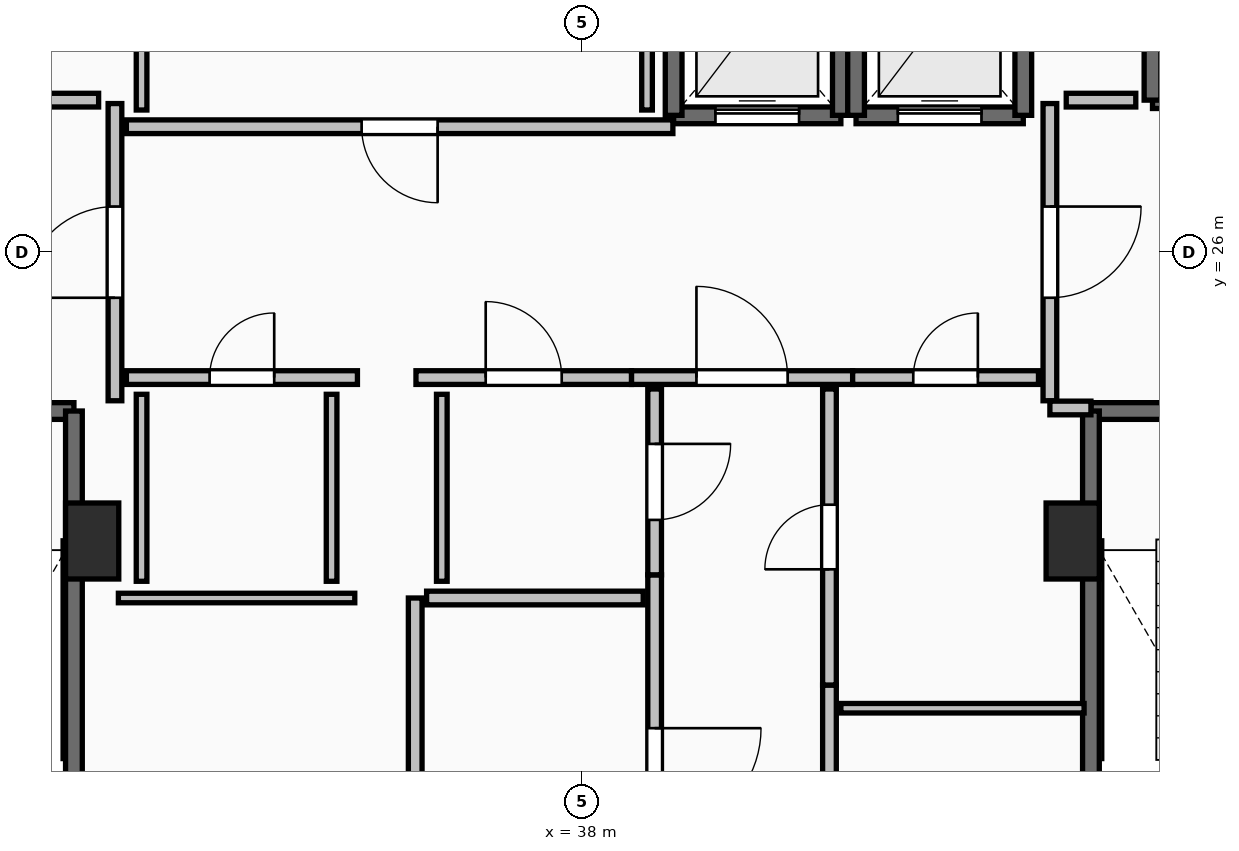
"""IFC4 building model, lengths in metres.
Left out: names, types, materials, properties, quantities, classifications, styles, units other than length and angle.
Written with IfcOpenShell. Run it as: python <this file> out.ifc"""

import sys

from ifc_helpers import new_model, si_unit, direction, frame, frame_2d, origin, origin_2d, place, context, subcontext, project, spatial, rectangle, extrude, element, fill, save


model = new_model("IFC4")
c1 = context("Model", 3, precision=1e-05, world=origin(), true_north=direction((0.0, 1.0)))
c2 = subcontext(c1, "Body", "Model", "MODEL_VIEW")
j1 = project(units=[si_unit("LENGTHUNIT", "METRE"), si_unit("PLANEANGLEUNIT", "RADIAN")], contexts=[c1])
p1 = place(None, origin())
s1 = spatial("IfcSite", under=j1, at=p1, CompositionType="ELEMENT")
p2 = place(p1, origin())
s2 = spatial("IfcBuilding", under=s1, at=p2, CompositionType="ELEMENT")
p3 = place(p2, frame((0.0, 0.0, 255.55)))
s3 = spatial("IfcBuildingStorey", under=s2, at=p3, CompositionType="ELEMENT", Elevation=255.55)
for number, where, z_axis, x_axis in (
    (1, (31.55, 22.2, 0.0), (0.0, 0.0, 1.0), (1.0, 0.0, 0.0)),
    (2, (44.45, 22.2, 0.0), (0.0, 0.0, 1.0), (1.0, 0.0, 0.0)),
):
    element("IfcColumn", number, at=place(p3, frame(where, z_axis=z_axis, x_axis=x_axis)), inside=s3, PredefinedType="PILASTER", context=c2, shape_type="SweptSolid", body=[
        extrude(rectangle(XDim=0.7, YDim=1.0, at=origin_2d()), origin(), (0.0, 0.0, 1.0), 3.55),
    ])
p4 = place(p3, frame((27.94, 23.91, 0.0), z_axis=(0.0, 0.0, 1.0), x_axis=(1.0, 0.0, 0.0)))
e3 = element("IfcWall", 3, at=p4, inside=s3, PredefinedType="SOLIDWALL", context=c2, shape_type="SweptSolid", body=[
    extrude(rectangle(XDim=3.37, YDim=0.22, at=frame_2d((1.685, 0.0))), origin(), (0.0, 0.0, 1.0), 3.29),
])
p5 = place(p4, frame((1.135, 0.0, 0.0)))
e4 = element("IfcOpeningElement", 4, at=p5, cuts=e3, PredefinedType="OPENING", context=c2, shape_type="SweptSolid", body=[
    extrude(rectangle(XDim=1.1, YDim=2.15, at=frame_2d((0.55, 1.075))), frame((0.0, 0.125, 0.0), z_axis=(0.0, -1.0, 0.0), x_axis=(1.0, 0.0, 0.0)), (0.0, 0.0, 1.0), 0.25),
])
p6 = place(p3, frame((31.31, 23.91, 0.0), z_axis=(0.0, 0.0, 1.0), x_axis=(0.0, -1.0, 0.0)))
e5 = element("IfcWall", 5, at=p6, inside=s3, PredefinedType="SOLIDWALL", context=c2, shape_type="SweptSolid", body=[
    extrude(rectangle(XDim=7.42, YDim=0.22, at=frame_2d((3.71, 0.0))), origin(), (0.0, 0.0, 1.0), 3.29),
])
p7 = place(p3, frame((44.69, 23.91, 0.0), z_axis=(0.0, 0.0, 1.0), x_axis=(1.0, 0.0, 0.0)))
e6 = element("IfcWall", 6, at=p7, inside=s3, PredefinedType="SOLIDWALL", context=c2, shape_type="SweptSolid", body=[
    extrude(rectangle(XDim=3.37, YDim=0.22, at=frame_2d((1.685, 0.0))), origin(), (0.0, 0.0, 1.0), 3.29),
])
p8 = place(p7, frame((1.135, 0.0, 0.0)))
e7 = element("IfcOpeningElement", 7, at=p8, cuts=e6, PredefinedType="OPENING", context=c2, shape_type="SweptSolid", body=[
    extrude(rectangle(XDim=1.1, YDim=2.15, at=frame_2d((0.55, 1.075))), frame((0.0, 0.125, 0.0), z_axis=(0.0, -1.0, 0.0), x_axis=(1.0, 0.0, 0.0)), (0.0, 0.0, 1.0), 0.25),
])
p9 = place(p3, frame((44.69, 16.49, 0.0), z_axis=(0.0, 0.0, 1.0), x_axis=(0.0, 1.0, 0.0)))
e8 = element("IfcWall", 8, at=p9, inside=s3, PredefinedType="SOLIDWALL", context=c2, shape_type="SweptSolid", body=[
    extrude(rectangle(XDim=7.42, YDim=0.22, at=frame_2d((3.71, 0.0))), origin(), (0.0, 0.0, 1.0), 3.29),
])
p10 = place(p3, frame((39.2, 27.8, 0.0), z_axis=(0.0, 0.0, 1.0), x_axis=(1.0, 0.0, 0.0)))
e9 = element("IfcWall", 9, at=p10, inside=s3, PredefinedType="SOLIDWALL", context=c2, shape_type="SweptSolid", body=[
    extrude(rectangle(XDim=2.2, YDim=0.22, at=frame_2d((1.1, 0.0))), origin(), (0.0, 0.0, 1.0), 3.29),
])
p11 = place(p10, frame((0.55, 0.0, 0.0)))
e10 = element("IfcOpeningElement", 10, at=p11, cuts=e9, PredefinedType="OPENING", context=c2, shape_type="SweptSolid", body=[
    extrude(rectangle(XDim=1.1, YDim=2.2, at=frame_2d((0.55, 1.1))), frame((0.0, 0.125, 0.0), z_axis=(0.0, -1.0, 0.0), x_axis=(1.0, 0.0, 0.0)), (0.0, 0.0, 1.0), 0.25),
])
for number, where, z_axis, x_axis in (
    (11, (41.4, 27.8, 0.0), (0.0, 0.0, 1.0), (0.0, 1.0, 0.0)),
    (12, (39.2, 30.4, 0.0), (0.0, 0.0, 1.0), (0.0, -1.0, 0.0)),
):
    element("IfcWall", number, at=place(p3, frame(where, z_axis=z_axis, x_axis=x_axis)), inside=s3, PredefinedType="SOLIDWALL", context=c2, shape_type="SweptSolid", body=[
        extrude(rectangle(XDim=2.6, YDim=0.22, at=frame_2d((1.3, 0.0))), origin(), (0.0, 0.0, 1.0), 3.29),
    ])
p12 = place(p3, frame((41.6, 27.8, 0.0), z_axis=(0.0, 0.0, 1.0), x_axis=(1.0, 0.0, 0.0)))
e13 = element("IfcWall", 13, at=p12, inside=s3, PredefinedType="SOLIDWALL", context=c2, shape_type="SweptSolid", body=[
    extrude(rectangle(XDim=2.2, YDim=0.22, at=frame_2d((1.1, 0.0))), origin(), (0.0, 0.0, 1.0), 3.29),
])
p13 = place(p12, frame((0.55, 0.0, 0.0)))
e14 = element("IfcOpeningElement", 14, at=p13, cuts=e13, PredefinedType="OPENING", context=c2, shape_type="SweptSolid", body=[
    extrude(rectangle(XDim=1.1, YDim=2.2, at=frame_2d((0.55, 1.1))), frame((0.0, 0.125, 0.0), z_axis=(0.0, -1.0, 0.0), x_axis=(1.0, 0.0, 0.0)), (0.0, 0.0, 1.0), 0.25),
])
for number, where, z_axis, x_axis in (
    (15, (43.8, 27.8, 0.0), (0.0, 0.0, 1.0), (0.0, 1.0, 0.0)),
    (16, (41.6, 30.4, 0.0), (0.0, 0.0, 1.0), (0.0, -1.0, 0.0)),
):
    element("IfcWall", number, at=place(p3, frame(where, z_axis=z_axis, x_axis=x_axis)), inside=s3, PredefinedType="SOLIDWALL", context=c2, shape_type="SweptSolid", body=[
        extrude(rectangle(XDim=2.6, YDim=0.22, at=frame_2d((1.3, 0.0))), origin(), (0.0, 0.0, 1.0), 3.29),
    ])
p14 = place(p3, frame((45.5, 28.0, 0.0), z_axis=(0.0, 0.0, 1.0), x_axis=(1.0, 0.0, 0.0)))
e17 = element("IfcWall", 17, at=p14, inside=s3, PredefinedType="SHEAR", context=c2, shape_type="SweptSolid", body=[
    extrude(rectangle(XDim=2.4, YDim=0.22, at=frame_2d((1.2, 0.0))), origin(), (0.0, 0.0, 1.0), 3.29),
])
p15 = place(p14, frame((0.6, 0.0, 0.0)))
e18 = element("IfcOpeningElement", 18, at=p15, cuts=e17, PredefinedType="OPENING", context=c2, shape_type="SweptSolid", body=[
    extrude(rectangle(XDim=1.2, YDim=2.2, at=frame_2d((0.6, 1.1))), frame((0.0, 0.125, 0.0), z_axis=(0.0, -1.0, 0.0), x_axis=(1.0, 0.0, 0.0)), (0.0, 0.0, 1.0), 0.25),
])
p16 = place(p3, frame((45.5, 30.5, 0.0), z_axis=(0.0, 0.0, 1.0), x_axis=(0.0, -1.0, 0.0)))
e19 = element("IfcWall", 19, at=p16, inside=s3, PredefinedType="SHEAR", context=c2, shape_type="SweptSolid", body=[
    extrude(rectangle(XDim=2.5, YDim=0.22, at=frame_2d((1.25, 0.0))), origin(), (0.0, 0.0, 1.0), 3.29),
])
p17 = place(p3, frame((31.85, 24.045, 0.0), z_axis=(0.0, 0.0, 1.0), x_axis=(0.0, 1.0, 0.0)))
e20 = element("IfcWall", 20, at=p17, inside=s3, PredefinedType="PARTITIONING", context=c2, shape_type="SweptSolid", body=[
    extrude(rectangle(XDim=3.91, YDim=0.18, at=frame_2d((1.955, 0.0))), origin(), (0.0, 0.0, 1.0), 3.29),
])
p18 = place(p17, frame((1.355, 0.0, 0.0)))
e21 = element("IfcOpeningElement", 21, at=p18, cuts=e20, PredefinedType="OPENING", context=c2, shape_type="SweptSolid", body=[
    extrude(rectangle(XDim=1.2, YDim=2.15, at=frame_2d((0.6, 1.075))), frame((0.0, 0.105, 0.0), z_axis=(0.0, -1.0, 0.0), x_axis=(1.0, 0.0, 0.0)), (0.0, 0.0, 1.0), 0.21),
])
p19 = place(p3, frame((44.15, 27.955, 0.0), z_axis=(0.0, 0.0, 1.0), x_axis=(0.0, -1.0, 0.0)))
e22 = element("IfcWall", 22, at=p19, inside=s3, PredefinedType="PARTITIONING", context=c2, shape_type="SweptSolid", body=[
    extrude(rectangle(XDim=3.91, YDim=0.18, at=frame_2d((1.955, 0.0))), origin(), (0.0, 0.0, 1.0), 3.29),
])
p20 = place(p19, frame((1.355, 0.0, 0.0)))
e23 = element("IfcOpeningElement", 23, at=p20, cuts=e22, PredefinedType="OPENING", context=c2, shape_type="SweptSolid", body=[
    extrude(rectangle(XDim=1.2, YDim=2.15, at=frame_2d((0.6, 1.075))), frame((0.0, 0.105, 0.0), z_axis=(0.0, -1.0, 0.0), x_axis=(1.0, 0.0, 0.0)), (0.0, 0.0, 1.0), 0.21),
])
p21 = place(p3, frame((44.15, 23.95, 0.0), z_axis=(0.0, 0.0, 1.0), x_axis=(1.0, 0.0, 0.0)))
e24 = element("IfcWall", 24, at=p21, inside=s3, PredefinedType="PARTITIONING", context=c2, shape_type="SweptSolid", body=[
    extrude(rectangle(XDim=0.54, YDim=0.18, at=frame_2d((0.27, 0.0))), origin(), (0.0, 0.0, 1.0), 3.29),
])
p22 = place(p3, frame((38.645, 24.35, 0.0), z_axis=(0.0, 0.0, 1.0), x_axis=(1.0, 0.0, 0.0)))
e25 = element("IfcWall", 25, at=p22, inside=s3, PredefinedType="PARTITIONING", context=c2, shape_type="SweptSolid", body=[
    extrude(rectangle(XDim=2.91, YDim=0.18, at=frame_2d((1.455, 0.0))), origin(), (0.0, 0.0, 1.0), 3.29),
])
p23 = place(p22, frame((0.855, 0.0, 0.0)))
e26 = element("IfcOpeningElement", 26, at=p23, cuts=e25, PredefinedType="OPENING", context=c2, shape_type="SweptSolid", body=[
    extrude(rectangle(XDim=1.2, YDim=2.15, at=frame_2d((0.6, 1.075))), frame((0.0, 0.105, 0.0), z_axis=(0.0, -1.0, 0.0), x_axis=(1.0, 0.0, 0.0)), (0.0, 0.0, 1.0), 0.21),
])
p24 = place(p3, frame((41.555, 24.35, 0.0), z_axis=(0.0, 0.0, 1.0), x_axis=(1.0, 0.0, 0.0)))
e27 = element("IfcWall", 27, at=p24, inside=s3, PredefinedType="PARTITIONING", context=c2, shape_type="SweptSolid", body=[
    extrude(rectangle(XDim=2.445, YDim=0.18, at=frame_2d((1.223, 0.0))), origin(), (0.0, 0.0, 1.0), 3.29),
])
p25 = place(p24, frame((0.798, 0.0, 0.0)))
e28 = element("IfcOpeningElement", 28, at=p25, cuts=e27, PredefinedType="OPENING", context=c2, shape_type="SweptSolid", body=[
    extrude(rectangle(XDim=0.85, YDim=2.1, at=frame_2d((0.425, 1.05))), frame((0.0, 0.105, 0.0), z_axis=(0.0, -1.0, 0.0), x_axis=(1.0, 0.0, 0.0)), (0.0, 0.0, 1.0), 0.21),
])
p26 = place(p3, frame((39.19, 27.65, 0.0), z_axis=(0.0, 0.0, 1.0), x_axis=(-1.0, 0.0, 0.0)))
e29 = element("IfcWall", 29, at=p26, inside=s3, PredefinedType="PARTITIONING", context=c2, shape_type="SweptSolid", body=[
    extrude(rectangle(XDim=7.19, YDim=0.18, at=frame_2d((3.595, 0.0))), origin(), (0.0, 0.0, 1.0), 3.29),
])
p27 = place(p26, frame((3.095, 0.0, 0.0)))
e30 = element("IfcOpeningElement", 30, at=p27, cuts=e29, PredefinedType="OPENING", context=c2, shape_type="SweptSolid", body=[
    extrude(rectangle(XDim=1.0, YDim=2.15, at=frame_2d((0.5, 1.075))), frame((0.0, 0.105, 0.0), z_axis=(0.0, -1.0, 0.0), x_axis=(1.0, 0.0, 0.0)), (0.0, 0.0, 1.0), 0.21),
])
p28 = place(p3, frame((32.0, 24.35, 0.0), z_axis=(0.0, 0.0, 1.0), x_axis=(1.0, 0.0, 0.0)))
e31 = element("IfcWall", 31, at=p28, inside=s3, PredefinedType="PARTITIONING", context=c2, shape_type="SweptSolid", body=[
    extrude(rectangle(XDim=3.04, YDim=0.18, at=frame_2d((1.52, 0.0))), origin(), (0.0, 0.0, 1.0), 3.29),
])
p29 = place(p28, frame((1.095, 0.0, 0.0)))
e32 = element("IfcOpeningElement", 32, at=p29, cuts=e31, PredefinedType="OPENING", context=c2, shape_type="SweptSolid", body=[
    extrude(rectangle(XDim=0.85, YDim=2.1, at=frame_2d((0.425, 1.05))), frame((0.0, 0.105, 0.0), z_axis=(0.0, -1.0, 0.0), x_axis=(1.0, 0.0, 0.0)), (0.0, 0.0, 1.0), 0.21),
])
p30 = place(p3, frame((35.81, 24.35, 0.0), z_axis=(0.0, 0.0, 1.0), x_axis=(1.0, 0.0, 0.0)))
e33 = element("IfcWall", 33, at=p30, inside=s3, PredefinedType="PARTITIONING", context=c2, shape_type="SweptSolid", body=[
    extrude(rectangle(XDim=2.835, YDim=0.18, at=frame_2d((1.417, 0.0))), origin(), (0.0, 0.0, 1.0), 3.29),
])
p31 = place(p30, frame((0.917, 0.0, 0.0)))
e34 = element("IfcOpeningElement", 34, at=p31, cuts=e33, PredefinedType="OPENING", context=c2, shape_type="SweptSolid", body=[
    extrude(rectangle(XDim=1.0, YDim=2.15, at=frame_2d((0.5, 1.075))), frame((0.0, 0.105, 0.0), z_axis=(0.0, -1.0, 0.0), x_axis=(1.0, 0.0, 0.0)), (0.0, 0.0, 1.0), 0.21),
])
p32 = place(p3, frame((41.25, 16.32, 0.0), z_axis=(0.0, 0.0, 1.0), x_axis=(0.0, 1.0, 0.0)))
e35 = element("IfcWall", 35, at=p32, inside=s3, PredefinedType="PARTITIONING", context=c2, shape_type="SweptSolid", body=[
    extrude(rectangle(XDim=3.985, YDim=0.18, at=frame_2d((1.992, 0.0))), origin(), (0.0, 0.0, 1.0), 3.29),
])
p33 = place(p32, frame((1.593, 0.0, 0.0)))
e36 = element("IfcOpeningElement", 36, at=p33, cuts=e35, PredefinedType="OPENING", context=c2, shape_type="SweptSolid", body=[
    extrude(rectangle(XDim=0.8, YDim=2.05, at=frame_2d((0.4, 1.025))), frame((0.0, 0.105, 0.0), z_axis=(0.0, -1.0, 0.0), x_axis=(1.0, 0.0, 0.0)), (0.0, 0.0, 1.0), 0.21),
])
p34 = place(p3, frame((41.25, 20.305, 0.0), z_axis=(0.0, 0.0, 1.0), x_axis=(0.0, 1.0, 0.0)))
e37 = element("IfcWall", 37, at=p34, inside=s3, PredefinedType="PARTITIONING", context=c2, shape_type="SweptSolid", body=[
    extrude(rectangle(XDim=3.895, YDim=0.18, at=frame_2d((1.948, 0.0))), origin(), (0.0, 0.0, 1.0), 2.482),
])
p35 = place(p34, frame((1.522, 0.0, 0.0)))
e38 = element("IfcOpeningElement", 38, at=p35, cuts=e37, PredefinedType="OPENING", context=c2, shape_type="SweptSolid", body=[
    extrude(rectangle(XDim=0.85, YDim=2.1, at=frame_2d((0.425, 1.05))), frame((0.0, 0.105, 0.0), z_axis=(0.0, -1.0, 0.0), x_axis=(1.0, 0.0, 0.0)), (0.0, 0.0, 1.0), 0.21),
])
p36 = place(p3, frame((38.95, 21.755, 0.0), z_axis=(0.0, 0.0, 1.0), x_axis=(0.0, -1.0, 0.0)))
e39 = element("IfcWall", 39, at=p36, inside=s3, PredefinedType="PARTITIONING", context=c2, shape_type="SweptSolid", body=[
    extrude(rectangle(XDim=5.435, YDim=0.18, at=frame_2d((2.717, 0.0))), origin(), (0.0, 0.0, 1.0), 3.29),
])
p37 = place(p36, frame((2.018, 0.0, 0.0)))
e40 = element("IfcOpeningElement", 40, at=p37, cuts=e39, PredefinedType="OPENING", context=c2, shape_type="SweptSolid", body=[
    extrude(rectangle(XDim=1.4, YDim=2.2, at=frame_2d((0.7, 1.1))), frame((0.0, 0.105, 0.0), z_axis=(0.0, -1.0, 0.0), x_axis=(1.0, 0.0, 0.0)), (0.0, 0.0, 1.0), 0.21),
])
p38 = place(p3, frame((38.95, 24.2, 0.0), z_axis=(0.0, 0.0, 1.0), x_axis=(0.0, -1.0, 0.0)))
e41 = element("IfcWall", 41, at=p38, inside=s3, PredefinedType="PARTITIONING", context=c2, shape_type="SweptSolid", body=[
    extrude(rectangle(XDim=2.445, YDim=0.18, at=frame_2d((1.223, 0.0))), origin(), (0.0, 0.0, 1.0), 2.482),
])
p39 = place(p38, frame((0.722, 0.0, 0.0)))
e42 = element("IfcOpeningElement", 42, at=p39, cuts=e41, PredefinedType="OPENING", context=c2, shape_type="SweptSolid", body=[
    extrude(rectangle(XDim=1.0, YDim=2.15, at=frame_2d((0.5, 1.075))), frame((0.0, 0.105, 0.0), z_axis=(0.0, -1.0, 0.0), x_axis=(1.0, 0.0, 0.0)), (0.0, 0.0, 1.0), 0.21),
])
p40 = place(p3, frame((44.6, 20.0, 0.0), z_axis=(0.0, 0.0, 1.0), x_axis=(-1.0, 0.0, 0.0)))
e43 = element("IfcWall", 43, at=p40, inside=s3, PredefinedType="PARTITIONING", context=c2, shape_type="SweptSolid", body=[
    extrude(rectangle(XDim=3.2, YDim=0.125, at=frame_2d((1.6, 0.0))), origin(), (0.0, 0.0, 1.0), 3.29),
])
p41 = place(p3, frame((35.8, 16.32, 0.0), z_axis=(0.0, 0.0, 1.0), x_axis=(0.0, 1.0, 0.0)))
e44 = element("IfcWall", 44, at=p41, inside=s3, PredefinedType="PARTITIONING", context=c2, shape_type="SweptSolid", body=[
    extrude(rectangle(XDim=5.13, YDim=0.18, at=frame_2d((2.565, 0.0))), origin(), (0.0, 0.0, 1.0), 3.29),
])
p42 = place(p3, frame((35.005, 21.45, 0.0), z_axis=(0.0, 0.0, 1.0), x_axis=(-1.0, 0.0, 0.0)))
e45 = element("IfcWall", 45, at=p42, inside=s3, PredefinedType="PARTITIONING", context=c2, shape_type="SweptSolid", body=[
    extrude(rectangle(XDim=3.11, YDim=0.125, at=frame_2d((1.555, 0.0))), origin(), (0.0, 0.0, 1.0), 3.29),
])
p43 = place(p3, frame((38.8, 21.45, 0.0), z_axis=(0.0, 0.0, 1.0), x_axis=(-1.0, 0.0, 0.0)))
e46 = element("IfcWall", 46, at=p43, inside=s3, PredefinedType="PARTITIONING", context=c2, shape_type="SweptSolid", body=[
    extrude(rectangle(XDim=2.85, YDim=0.18, at=frame_2d((1.425, 0.0))), origin(), (0.0, 0.0, 1.0), 3.29),
])
for number, where, z_axis, x_axis in (
    (47, (31.635, 28.0, 0.0), (0.0, 0.0, 1.0), (-1.0, 0.0, 0.0)),
    (48, (45.28, 28.0, 0.0), (0.0, 0.0, 1.0), (-1.0, 0.0, 0.0)),
):
    element("IfcWall", number, at=place(p3, frame(where, z_axis=z_axis, x_axis=x_axis)), inside=s3, PredefinedType="PARTITIONING", context=c2, shape_type="SweptSolid", body=[
        extrude(rectangle(XDim=0.915, YDim=0.18, at=frame_2d((0.458, 0.0))), origin(), (0.0, 0.0, 1.0), 3.29),
    ])
for number, where, z_axis, x_axis in (
    (49, (32.2, 30.26, 0.0), (0.0, 0.0, 1.0), (0.0, -1.0, 0.0)),
    (50, (38.85, 27.87, 0.0), (0.0, 0.0, 1.0), (0.0, 1.0, 0.0)),
):
    element("IfcWall", number, at=place(p3, frame(where, z_axis=z_axis, x_axis=x_axis)), inside=s3, PredefinedType="PARTITIONING", context=c2, shape_type="SweptSolid", body=[
        extrude(rectangle(XDim=2.39, YDim=0.14, at=frame_2d((1.195, 0.0))), origin(), (0.0, 0.0, 1.0), 3.29),
    ])
for number, where, z_axis, x_axis in (
    (51, (32.2, 24.13, 0.0), (0.0, 0.0, 1.0), (0.0, -1.0, 0.0)),
    (52, (34.7, 21.67, 0.0), (0.0, 0.0, 1.0), (0.0, 1.0, 0.0)),
    (53, (36.15, 24.13, 0.0), (0.0, 0.0, 1.0), (0.0, -1.0, 0.0)),
):
    element("IfcWall", number, at=place(p3, frame(where, z_axis=z_axis, x_axis=x_axis)), inside=s3, PredefinedType="PARTITIONING", context=c2, shape_type="SweptSolid", body=[
        extrude(rectangle(XDim=2.46, YDim=0.14, at=frame_2d((1.23, 0.0))), origin(), (0.0, 0.0, 1.0), 2.482),
    ])
p44 = place(p11, origin())
e54 = element("IfcDoor", 54, at=p44, inside=s3, OperationType="SLIDING_TO_LEFT", PredefinedType="DOOR", context=c2, shape_type="SweptSolid", body=[
    extrude(rectangle(XDim=1.1, YDim=2.2, at=frame_2d((0.55, 1.1))), frame((0.0, 0.025, 0.0), z_axis=(0.0, -1.0, 0.0), x_axis=(1.0, 0.0, 0.0)), (0.0, 0.0, 1.0), 0.05),
])
fill(e10, e54)
p45 = place(p13, origin())
e55 = element("IfcDoor", 55, at=p45, inside=s3, OperationType="SLIDING_TO_LEFT", PredefinedType="DOOR", context=c2, shape_type="SweptSolid", body=[
    extrude(rectangle(XDim=1.1, YDim=2.2, at=frame_2d((0.55, 1.1))), frame((0.0, 0.025, 0.0), z_axis=(0.0, -1.0, 0.0), x_axis=(1.0, 0.0, 0.0)), (0.0, 0.0, 1.0), 0.05),
])
fill(e14, e55)
p46 = place(p18, origin())
e56 = element("IfcDoor", 56, at=p46, inside=s3, OperationType="SINGLE_SWING_LEFT", PredefinedType="DOOR", context=c2, shape_type="SweptSolid", body=[
    extrude(rectangle(XDim=1.2, YDim=2.15, at=frame_2d((0.6, 1.075))), frame((0.0, 0.025, 0.0), z_axis=(0.0, -1.0, 0.0), x_axis=(1.0, 0.0, 0.0)), (0.0, 0.0, 1.0), 0.05),
])
fill(e21, e56)
p47 = place(p20, origin())
e57 = element("IfcDoor", 57, at=p47, inside=s3, OperationType="SINGLE_SWING_LEFT", PredefinedType="DOOR", context=c2, shape_type="SweptSolid", body=[
    extrude(rectangle(XDim=1.2, YDim=2.15, at=frame_2d((0.6, 1.075))), frame((0.0, 0.025, 0.0), z_axis=(0.0, -1.0, 0.0), x_axis=(1.0, 0.0, 0.0)), (0.0, 0.0, 1.0), 0.05),
])
fill(e23, e57)
p48 = place(p23, origin())
e58 = element("IfcDoor", 58, at=p48, inside=s3, OperationType="SINGLE_SWING_LEFT", PredefinedType="DOOR", context=c2, shape_type="SweptSolid", body=[
    extrude(rectangle(XDim=1.2, YDim=2.15, at=frame_2d((0.6, 1.075))), frame((0.0, 0.025, 0.0), z_axis=(0.0, -1.0, 0.0), x_axis=(1.0, 0.0, 0.0)), (0.0, 0.0, 1.0), 0.05),
])
fill(e26, e58)
p49 = place(p25, origin())
e59 = element("IfcDoor", 59, at=p49, inside=s3, OperationType="SINGLE_SWING_RIGHT", PredefinedType="DOOR", context=c2, shape_type="SweptSolid", body=[
    extrude(rectangle(XDim=0.85, YDim=2.1, at=frame_2d((0.425, 1.05))), frame((0.0, 0.025, 0.0), z_axis=(0.0, -1.0, 0.0), x_axis=(1.0, 0.0, 0.0)), (0.0, 0.0, 1.0), 0.05),
])
fill(e28, e59)
p50 = place(p27, origin())
e60 = element("IfcDoor", 60, at=p50, inside=s3, OperationType="SINGLE_SWING_LEFT", PredefinedType="DOOR", context=c2, shape_type="SweptSolid", body=[
    extrude(rectangle(XDim=1.0, YDim=2.15, at=frame_2d((0.5, 1.075))), frame((0.0, 0.025, 0.0), z_axis=(0.0, -1.0, 0.0), x_axis=(1.0, 0.0, 0.0)), (0.0, 0.0, 1.0), 0.05),
])
fill(e30, e60)
p51 = place(p29, origin())
e61 = element("IfcDoor", 61, at=p51, inside=s3, OperationType="SINGLE_SWING_RIGHT", PredefinedType="DOOR", context=c2, shape_type="SweptSolid", body=[
    extrude(rectangle(XDim=0.85, YDim=2.1, at=frame_2d((0.425, 1.05))), frame((0.0, 0.025, 0.0), z_axis=(0.0, -1.0, 0.0), x_axis=(1.0, 0.0, 0.0)), (0.0, 0.0, 1.0), 0.05),
])
fill(e32, e61)
p52 = place(p31, origin())
e62 = element("IfcDoor", 62, at=p52, inside=s3, OperationType="SINGLE_SWING_LEFT", PredefinedType="DOOR", context=c2, shape_type="SweptSolid", body=[
    extrude(rectangle(XDim=1.0, YDim=2.15, at=frame_2d((0.5, 1.075))), frame((0.0, 0.025, 0.0), z_axis=(0.0, -1.0, 0.0), x_axis=(1.0, 0.0, 0.0)), (0.0, 0.0, 1.0), 0.05),
])
fill(e34, e62)
p53 = place(p35, origin())
e63 = element("IfcDoor", 63, at=p53, inside=s3, OperationType="SINGLE_SWING_LEFT", PredefinedType="DOOR", context=c2, shape_type="SweptSolid", body=[
    extrude(rectangle(XDim=0.85, YDim=2.1, at=frame_2d((0.425, 1.05))), frame((0.0, 0.025, 0.0), z_axis=(0.0, -1.0, 0.0), x_axis=(1.0, 0.0, 0.0)), (0.0, 0.0, 1.0), 0.05),
])
fill(e38, e63)
p54 = place(p37, origin())
e64 = element("IfcDoor", 64, at=p54, inside=s3, OperationType="DOUBLE_SWING_LEFT", PredefinedType="DOOR", context=c2, shape_type="SweptSolid", body=[
    extrude(rectangle(XDim=1.4, YDim=2.2, at=frame_2d((0.7, 1.1))), frame((0.0, 0.025, 0.0), z_axis=(0.0, -1.0, 0.0), x_axis=(1.0, 0.0, 0.0)), (0.0, 0.0, 1.0), 0.05),
])
fill(e40, e64)
p55 = place(p39, origin())
e65 = element("IfcDoor", 65, at=p55, inside=s3, OperationType="SINGLE_SWING_LEFT", PredefinedType="DOOR", context=c2, shape_type="SweptSolid", body=[
    extrude(rectangle(XDim=1.0, YDim=2.15, at=frame_2d((0.5, 1.075))), frame((0.0, 0.025, 0.0), z_axis=(0.0, -1.0, 0.0), x_axis=(1.0, 0.0, 0.0)), (0.0, 0.0, 1.0), 0.05),
])
fill(e42, e65)
save(model, sys.argv[1])
